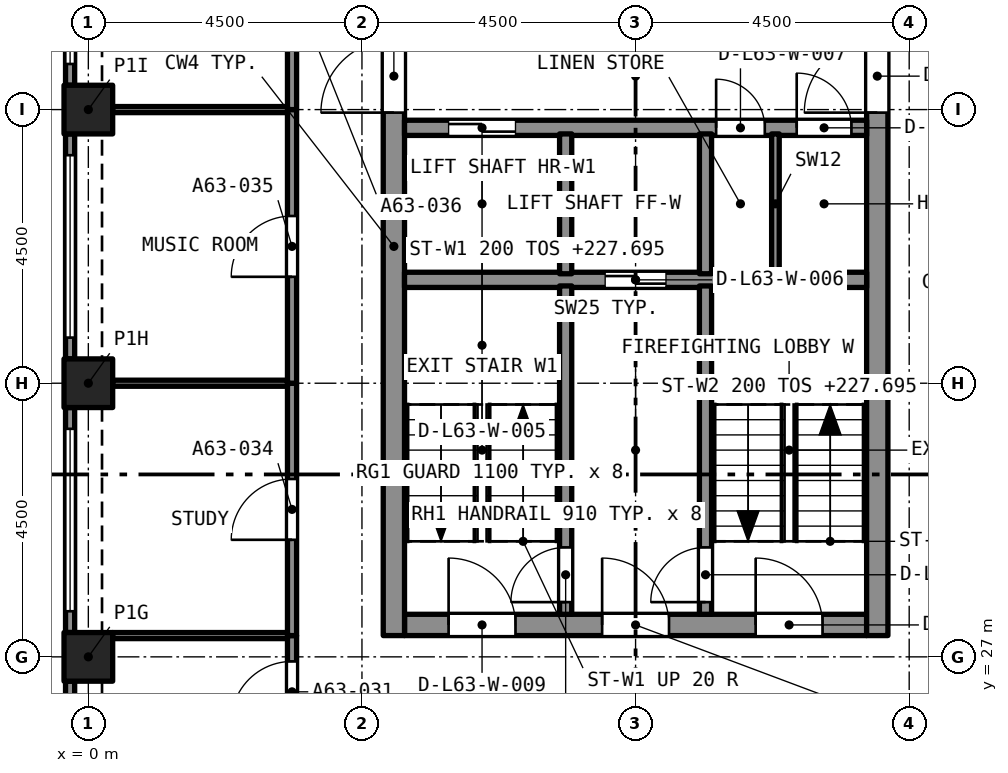
"""IFC4 building model, lengths in metres.
Left out: names, types, materials, properties, quantities, classifications, styles, units other than length and angle.
Written with IfcOpenShell. Run it as: python <this file> out.ifc"""

import sys

from ifc_helpers import new_model, si_unit, direction, frame, frame_2d, origin, origin_2d, place, context, subcontext, project, spatial, rectangle, extrude, element, fill, save


model = new_model("IFC4")
c1 = context("Model", 3, precision=1e-05, world=origin(), true_north=direction((0.0, 1.0)))
c2 = subcontext(c1, "Body", "Model", "MODEL_VIEW")
j1 = project(units=[si_unit("LENGTHUNIT", "METRE"), si_unit("PLANEANGLEUNIT", "RADIAN")], contexts=[c1])
p1 = place(None, origin())
s1 = spatial("IfcSite", under=j1, at=p1, CompositionType="ELEMENT")
p2 = place(p1, origin())
s2 = spatial("IfcBuilding", under=s1, at=p2, CompositionType="ELEMENT")
p3 = place(p2, frame((0.0, 0.0, 226.095)))
s3 = spatial("IfcBuildingStorey", under=s2, at=p3, CompositionType="ELEMENT", Elevation=226.095)
for number, where, z_axis, x_axis in (
    (1, (0.0, 27.0, 0.0), (0.0, 0.0, 1.0), (1.0, 0.0, 0.0)),
    (2, (0.0, 31.5, 0.0), (0.0, 0.0, 1.0), (1.0, 0.0, 0.0)),
    (3, (0.0, 36.0, 0.0), (0.0, 0.0, 1.0), (1.0, 0.0, 0.0)),
):
    element("IfcColumn", number, at=place(p3, frame(where, z_axis=z_axis, x_axis=x_axis)), inside=s3, PredefinedType="COLUMN", context=c2, shape_type="SweptSolid", body=[
        extrude(rectangle(XDim=0.8, YDim=0.8, at=origin_2d()), origin(), (0.0, 0.0, 1.0), 3.2),
    ])
p4 = place(p3, frame((5.2, 27.525, 0.0), z_axis=(0.0, 0.0, 1.0), x_axis=(1.0, 0.0, 0.0)))
e4 = element("IfcWall", 4, at=p4, inside=s3, PredefinedType="SOLIDWALL", context=c2, shape_type="SweptSolid", body=[
    extrude(rectangle(XDim=7.6, YDim=0.35, at=frame_2d((3.8, 0.0))), origin(), (0.0, 0.0, 1.0), 3.2),
])
p5 = place(p4, frame((0.725, 0.0, 0.0)))
e5 = element("IfcOpeningElement", 5, at=p5, cuts=e4, PredefinedType="OPENING", context=c2, shape_type="SweptSolid", body=[
    extrude(rectangle(XDim=1.1, YDim=2.1, at=frame_2d((0.55, 1.05))), frame((0.0, 0.185, 0.0), z_axis=(0.0, -1.0, 0.0), x_axis=(1.0, 0.0, 0.0)), (0.0, 0.0, 1.0), 0.37),
])
p6 = place(p4, frame((3.25, 0.0, 0.0)))
e6 = element("IfcOpeningElement", 6, at=p6, cuts=e4, PredefinedType="OPENING", context=c2, shape_type="SweptSolid", body=[
    extrude(rectangle(XDim=1.1, YDim=2.1, at=frame_2d((0.55, 1.05))), frame((0.0, 0.185, 0.0), z_axis=(0.0, -1.0, 0.0), x_axis=(1.0, 0.0, 0.0)), (0.0, 0.0, 1.0), 0.37),
])
p7 = place(p4, frame((5.775, 0.0, 0.0)))
e7 = element("IfcOpeningElement", 7, at=p7, cuts=e4, PredefinedType="OPENING", context=c2, shape_type="SweptSolid", body=[
    extrude(rectangle(XDim=1.1, YDim=2.1, at=frame_2d((0.55, 1.05))), frame((0.0, 0.185, 0.0), z_axis=(0.0, -1.0, 0.0), x_axis=(1.0, 0.0, 0.0)), (0.0, 0.0, 1.0), 0.37),
])
p8 = place(p3, frame((5.025, 27.35, 0.0), z_axis=(0.0, 0.0, 1.0), x_axis=(0.0, 1.0, 0.0)))
e8 = element("IfcWall", 8, at=p8, inside=s3, PredefinedType="SOLIDWALL", context=c2, shape_type="SweptSolid", body=[
    extrude(rectangle(XDim=12.8, YDim=0.35, at=frame_2d((6.4, 0.0))), origin(), (0.0, 0.0, 1.0), 3.2),
])
p9 = place(p8, frame((8.6, 0.0, 0.0)))
e9 = element("IfcOpeningElement", 9, at=p9, cuts=e8, PredefinedType="OPENING", context=c2, shape_type="SweptSolid", body=[
    extrude(rectangle(XDim=1.2, YDim=2.1, at=frame_2d((0.6, 1.05))), frame((0.0, 0.185, 0.0), z_axis=(0.0, -1.0, 0.0), x_axis=(1.0, 0.0, 0.0)), (0.0, 0.0, 1.0), 0.37),
])
p10 = place(p3, frame((12.975, 27.35, 0.0), z_axis=(0.0, 0.0, 1.0), x_axis=(0.0, 1.0, 0.0)))
e10 = element("IfcWall", 10, at=p10, inside=s3, PredefinedType="SOLIDWALL", context=c2, shape_type="SweptSolid", body=[
    extrude(rectangle(XDim=12.8, YDim=0.35, at=frame_2d((6.4, 0.0))), origin(), (0.0, 0.0, 1.0), 3.2),
])
p11 = place(p10, frame((10.75, 0.0, 0.0)))
e11 = element("IfcOpeningElement", 11, at=p11, cuts=e10, PredefinedType="OPENING", context=c2, shape_type="SweptSolid", body=[
    extrude(rectangle(XDim=1.1, YDim=2.1, at=frame_2d((0.55, 1.05))), frame((0.0, 0.185, 0.0), z_axis=(0.0, -1.0, 0.0), x_axis=(1.0, 0.0, 0.0)), (0.0, 0.0, 1.0), 0.37),
])
p12 = place(p10, frame((8.6, 0.0, 0.0)))
e12 = element("IfcOpeningElement", 12, at=p12, cuts=e10, PredefinedType="OPENING", context=c2, shape_type="SweptSolid", body=[
    extrude(rectangle(XDim=1.2, YDim=2.1, at=frame_2d((0.6, 1.05))), frame((0.0, 0.185, 0.0), z_axis=(0.0, -1.0, 0.0), x_axis=(1.0, 0.0, 0.0)), (0.0, 0.0, 1.0), 0.37),
])
p13 = place(p3, frame((-0.3, 36.4, 0.0), z_axis=(0.0, 0.0, 1.0), x_axis=(0.0, 1.0, 0.0)))
e13 = element("IfcWall", 13, at=p13, inside=s3, PredefinedType="SOLIDWALL", context=c2, shape_type="SweptSolid", body=[
    extrude(rectangle(XDim=3.7, YDim=0.15, at=frame_2d((1.85, 0.0))), origin(), (0.0, 0.0, 1.0), 3.2),
])
p14 = place(p13, frame((0.35, 0.0, 0.45)))
e14 = element("IfcOpeningElement", 14, at=p14, cuts=e13, PredefinedType="OPENING", context=c2, shape_type="SweptSolid", body=[
    extrude(rectangle(XDim=3.0, YDim=1.95, at=frame_2d((1.5, 0.975))), frame((0.0, 0.085, 0.0), z_axis=(0.0, -1.0, 0.0), x_axis=(1.0, 0.0, 0.0)), (0.0, 0.0, 1.0), 0.17),
])
p15 = place(p3, frame((-0.3, 31.9, 0.0), z_axis=(0.0, 0.0, 1.0), x_axis=(0.0, 1.0, 0.0)))
e15 = element("IfcWall", 15, at=p15, inside=s3, PredefinedType="SOLIDWALL", context=c2, shape_type="SweptSolid", body=[
    extrude(rectangle(XDim=3.7, YDim=0.15, at=frame_2d((1.85, 0.0))), origin(), (0.0, 0.0, 1.0), 3.2),
])
p16 = place(p15, frame((0.35, 0.0, 0.45)))
e16 = element("IfcOpeningElement", 16, at=p16, cuts=e15, PredefinedType="OPENING", context=c2, shape_type="SweptSolid", body=[
    extrude(rectangle(XDim=3.0, YDim=1.95, at=frame_2d((1.5, 0.975))), frame((0.0, 0.085, 0.0), z_axis=(0.0, -1.0, 0.0), x_axis=(1.0, 0.0, 0.0)), (0.0, 0.0, 1.0), 0.17),
])
p17 = place(p3, frame((-0.3, 27.4, 0.0), z_axis=(0.0, 0.0, 1.0), x_axis=(0.0, 1.0, 0.0)))
e17 = element("IfcWall", 17, at=p17, inside=s3, PredefinedType="SOLIDWALL", context=c2, shape_type="SweptSolid", body=[
    extrude(rectangle(XDim=3.7, YDim=0.15, at=frame_2d((1.85, 0.0))), origin(), (0.0, 0.0, 1.0), 3.2),
])
p18 = place(p17, frame((0.35, 0.0, 0.45)))
e18 = element("IfcOpeningElement", 18, at=p18, cuts=e17, PredefinedType="OPENING", context=c2, shape_type="SweptSolid", body=[
    extrude(rectangle(XDim=3.0, YDim=1.95, at=frame_2d((1.5, 0.975))), frame((0.0, 0.085, 0.0), z_axis=(0.0, -1.0, 0.0), x_axis=(1.0, 0.0, 0.0)), (0.0, 0.0, 1.0), 0.17),
])
p19 = place(p3, frame((-0.3, 22.9, 0.0), z_axis=(0.0, 0.0, 1.0), x_axis=(0.0, 1.0, 0.0)))
e19 = element("IfcWall", 19, at=p19, inside=s3, PredefinedType="SOLIDWALL", context=c2, shape_type="SweptSolid", body=[
    extrude(rectangle(XDim=3.7, YDim=0.15, at=frame_2d((1.85, 0.0))), origin(), (0.0, 0.0, 1.0), 3.2),
])
p20 = place(p19, frame((0.35, 0.0, 0.45)))
e20 = element("IfcOpeningElement", 20, at=p20, cuts=e19, PredefinedType="OPENING", context=c2, shape_type="SweptSolid", body=[
    extrude(rectangle(XDim=3.0, YDim=1.95, at=frame_2d((1.5, 0.975))), frame((0.0, 0.085, 0.0), z_axis=(0.0, -1.0, 0.0), x_axis=(1.0, 0.0, 0.0)), (0.0, 0.0, 1.0), 0.17),
])
p21 = place(p3, frame((3.35, 25.425, 0.0), z_axis=(0.0, 0.0, 1.0), x_axis=(0.0, 1.0, 0.0)))
e21 = element("IfcWall", 21, at=p21, inside=s3, PredefinedType="PARTITIONING", context=c2, shape_type="SweptSolid", body=[
    extrude(rectangle(XDim=1.925, YDim=0.15, at=frame_2d((0.962, 0.0))), origin(), (0.0, 0.0, 1.0), 2.9),
])
p22 = place(p21, frame((0.5, 0.0, 0.0)))
e22 = element("IfcOpeningElement", 22, at=p22, cuts=e21, PredefinedType="OPENING", context=c2, shape_type="SweptSolid", body=[
    extrude(rectangle(XDim=1.0, YDim=2.1, at=frame_2d((0.5, 1.05))), frame((0.0, 0.085, 0.0), z_axis=(0.0, -1.0, 0.0), x_axis=(1.0, 0.0, 0.0)), (0.0, 0.0, 1.0), 0.17),
])
p23 = place(p3, frame((3.35, 27.35, 0.0), z_axis=(0.0, 0.0, 1.0), x_axis=(0.0, 1.0, 0.0)))
e23 = element("IfcWall", 23, at=p23, inside=s3, PredefinedType="PARTITIONING", context=c2, shape_type="SweptSolid", body=[
    extrude(rectangle(XDim=4.15, YDim=0.15, at=frame_2d((2.075, 0.0))), origin(), (0.0, 0.0, 1.0), 2.9),
])
p24 = place(p23, frame((1.575, 0.0, 0.0)))
e24 = element("IfcOpeningElement", 24, at=p24, cuts=e23, PredefinedType="OPENING", context=c2, shape_type="SweptSolid", body=[
    extrude(rectangle(XDim=1.0, YDim=2.1, at=frame_2d((0.5, 1.05))), frame((0.0, 0.085, 0.0), z_axis=(0.0, -1.0, 0.0), x_axis=(1.0, 0.0, 0.0)), (0.0, 0.0, 1.0), 0.17),
])
p25 = place(p3, frame((3.35, 31.5, 0.0), z_axis=(0.0, 0.0, 1.0), x_axis=(0.0, 1.0, 0.0)))
e25 = element("IfcWall", 25, at=p25, inside=s3, PredefinedType="PARTITIONING", context=c2, shape_type="SweptSolid", body=[
    extrude(rectangle(XDim=4.5, YDim=0.15, at=frame_2d((2.25, 0.0))), origin(), (0.0, 0.0, 1.0), 2.9),
])
p26 = place(p25, frame((1.75, 0.0, 0.0)))
e26 = element("IfcOpeningElement", 26, at=p26, cuts=e25, PredefinedType="OPENING", context=c2, shape_type="SweptSolid", body=[
    extrude(rectangle(XDim=1.0, YDim=2.1, at=frame_2d((0.5, 1.05))), frame((0.0, 0.085, 0.0), z_axis=(0.0, -1.0, 0.0), x_axis=(1.0, 0.0, 0.0)), (0.0, 0.0, 1.0), 0.17),
])
p27 = place(p3, frame((3.35, 36.0, 0.0), z_axis=(0.0, 0.0, 1.0), x_axis=(0.0, 1.0, 0.0)))
e27 = element("IfcWall", 27, at=p27, inside=s3, PredefinedType="PARTITIONING", context=c2, shape_type="SweptSolid", body=[
    extrude(rectangle(XDim=4.025, YDim=0.15, at=frame_2d((2.012, 0.0))), origin(), (0.0, 0.0, 1.0), 2.9),
])
p28 = place(p27, frame((1.575, 0.0, 0.0)))
e28 = element("IfcOpeningElement", 28, at=p28, cuts=e27, PredefinedType="OPENING", context=c2, shape_type="SweptSolid", body=[
    extrude(rectangle(XDim=1.0, YDim=2.1, at=frame_2d((0.5, 1.05))), frame((0.0, 0.085, 0.0), z_axis=(0.0, -1.0, 0.0), x_axis=(1.0, 0.0, 0.0)), (0.0, 0.0, 1.0), 0.17),
])
for number, where, z_axis, x_axis in (
    (29, (0.4, 27.35, 0.0), (0.0, 0.0, 1.0), (1.0, 0.0, 0.0)),
    (30, (0.4, 31.5, 0.0), (0.0, 0.0, 1.0), (1.0, 0.0, 0.0)),
    (31, (0.4, 36.0, 0.0), (0.0, 0.0, 1.0), (1.0, 0.0, 0.0)),
):
    element("IfcWall", number, at=place(p3, frame(where, z_axis=z_axis, x_axis=x_axis)), inside=s3, PredefinedType="PARTITIONING", context=c2, shape_type="SweptSolid", body=[
        extrude(rectangle(XDim=2.875, YDim=0.1, at=frame_2d((1.438, 0.0))), origin(), (0.0, 0.0, 1.0), 2.9),
    ])
p29 = place(p3, frame((5.2, 33.2, 0.0), z_axis=(0.0, 0.0, 1.0), x_axis=(1.0, 0.0, 0.0)))
e32 = element("IfcWall", 32, at=p29, inside=s3, PredefinedType="SOLIDWALL", context=c2, shape_type="SweptSolid", body=[
    extrude(rectangle(XDim=7.6, YDim=0.25, at=frame_2d((3.8, 0.0))), origin(), (0.0, 0.0, 1.0), 2.9),
])
p30 = place(p29, frame((3.3, 0.0, 0.0)))
e33 = element("IfcOpeningElement", 33, at=p30, cuts=e32, PredefinedType="OPENING", context=c2, shape_type="SweptSolid", body=[
    extrude(rectangle(XDim=1.0, YDim=2.1, at=frame_2d((0.5, 1.05))), frame((0.0, 0.135, 0.0), z_axis=(0.0, -1.0, 0.0), x_axis=(1.0, 0.0, 0.0)), (0.0, 0.0, 1.0), 0.27),
])
p31 = place(p3, frame((5.2, 35.7, 0.0), z_axis=(0.0, 0.0, 1.0), x_axis=(1.0, 0.0, 0.0)))
e34 = element("IfcWall", 34, at=p31, inside=s3, PredefinedType="SOLIDWALL", context=c2, shape_type="SweptSolid", body=[
    extrude(rectangle(XDim=7.6, YDim=0.25, at=frame_2d((3.8, 0.0))), origin(), (0.0, 0.0, 1.0), 2.9),
])
p32 = place(p31, frame((0.725, 0.0, 0.0)))
e35 = element("IfcOpeningElement", 35, at=p32, cuts=e34, PredefinedType="OPENING", context=c2, shape_type="SweptSolid", body=[
    extrude(rectangle(XDim=1.1, YDim=2.4, at=frame_2d((0.55, 1.2))), frame((0.0, 0.135, 0.0), z_axis=(0.0, -1.0, 0.0), x_axis=(1.0, 0.0, 0.0)), (0.0, 0.0, 1.0), 0.27),
])
p33 = place(p31, frame((5.125, 0.0, 0.0)))
e36 = element("IfcOpeningElement", 36, at=p33, cuts=e34, PredefinedType="OPENING", context=c2, shape_type="SweptSolid", body=[
    extrude(rectangle(XDim=0.8, YDim=2.1, at=frame_2d((0.4, 1.05))), frame((0.0, 0.135, 0.0), z_axis=(0.0, -1.0, 0.0), x_axis=(1.0, 0.0, 0.0)), (0.0, 0.0, 1.0), 0.27),
])
p34 = place(p31, frame((6.45, 0.0, 0.0)))
e37 = element("IfcOpeningElement", 37, at=p34, cuts=e34, PredefinedType="OPENING", context=c2, shape_type="SweptSolid", body=[
    extrude(rectangle(XDim=0.9, YDim=2.1, at=frame_2d((0.45, 1.05))), frame((0.0, 0.135, 0.0), z_axis=(0.0, -1.0, 0.0), x_axis=(1.0, 0.0, 0.0)), (0.0, 0.0, 1.0), 0.27),
])
p35 = place(p3, frame((7.85, 27.7, 0.0), z_axis=(0.0, 0.0, 1.0), x_axis=(0.0, 1.0, 0.0)))
e38 = element("IfcWall", 38, at=p35, inside=s3, PredefinedType="SOLIDWALL", context=c2, shape_type="SweptSolid", body=[
    extrude(rectangle(XDim=5.4, YDim=0.2, at=frame_2d((2.7, 0.0))), origin(), (0.0, 0.0, 1.0), 2.9),
])
p36 = place(p35, frame((0.2, 0.0, 0.0)))
e39 = element("IfcOpeningElement", 39, at=p36, cuts=e38, PredefinedType="OPENING", context=c2, shape_type="SweptSolid", body=[
    extrude(rectangle(XDim=0.9, YDim=2.1, at=frame_2d((0.45, 1.05))), frame((0.0, 0.11, 0.0), z_axis=(0.0, -1.0, 0.0), x_axis=(1.0, 0.0, 0.0)), (0.0, 0.0, 1.0), 0.22),
])
p37 = place(p3, frame((10.15, 27.7, 0.0), z_axis=(0.0, 0.0, 1.0), x_axis=(0.0, 1.0, 0.0)))
e40 = element("IfcWall", 40, at=p37, inside=s3, PredefinedType="SOLIDWALL", context=c2, shape_type="SweptSolid", body=[
    extrude(rectangle(XDim=5.4, YDim=0.2, at=frame_2d((2.7, 0.0))), origin(), (0.0, 0.0, 1.0), 2.9),
])
p38 = place(p37, frame((0.2, 0.0, 0.0)))
e41 = element("IfcOpeningElement", 41, at=p38, cuts=e40, PredefinedType="OPENING", context=c2, shape_type="SweptSolid", body=[
    extrude(rectangle(XDim=0.9, YDim=2.1, at=frame_2d((0.45, 1.05))), frame((0.0, 0.11, 0.0), z_axis=(0.0, -1.0, 0.0), x_axis=(1.0, 0.0, 0.0)), (0.0, 0.0, 1.0), 0.22),
])
for number, where, z_axis, x_axis in (
    (42, (7.85, 33.3, 0.0), (0.0, 0.0, 1.0), (0.0, 1.0, 0.0)),
    (43, (10.15, 33.3, 0.0), (0.0, 0.0, 1.0), (0.0, 1.0, 0.0)),
):
    element("IfcWall", number, at=place(p3, frame(where, z_axis=z_axis, x_axis=x_axis)), inside=s3, PredefinedType="SOLIDWALL", context=c2, shape_type="SweptSolid", body=[
        extrude(rectangle(XDim=2.3, YDim=0.2, at=frame_2d((1.15, 0.0))), origin(), (0.0, 0.0, 1.0), 2.9),
    ])
p39 = place(p3, frame((11.3, 33.3, 0.0), z_axis=(0.0, 0.0, 1.0), x_axis=(0.0, 1.0, 0.0)))
e44 = element("IfcWall", 44, at=p39, inside=s3, PredefinedType="PARTITIONING", context=c2, shape_type="SweptSolid", body=[
    extrude(rectangle(XDim=2.3, YDim=0.125, at=frame_2d((1.15, 0.0))), origin(), (0.0, 0.0, 1.0), 2.9),
])
p40 = place(p14, origin())
e45 = element("IfcWindow", 45, at=p40, inside=s3, PartitioningType="SINGLE_PANEL", PredefinedType="WINDOW", context=c2, shape_type="SweptSolid", body=[
    extrude(rectangle(XDim=3.0, YDim=1.95, at=frame_2d((1.5, 0.975))), frame((0.0, 0.03, 0.0), z_axis=(0.0, -1.0, 0.0), x_axis=(1.0, 0.0, 0.0)), (0.0, 0.0, 1.0), 0.06),
])
fill(e14, e45)
p41 = place(p16, origin())
e46 = element("IfcWindow", 46, at=p41, inside=s3, PartitioningType="SINGLE_PANEL", PredefinedType="WINDOW", context=c2, shape_type="SweptSolid", body=[
    extrude(rectangle(XDim=3.0, YDim=1.95, at=frame_2d((1.5, 0.975))), frame((0.0, 0.03, 0.0), z_axis=(0.0, -1.0, 0.0), x_axis=(1.0, 0.0, 0.0)), (0.0, 0.0, 1.0), 0.06),
])
fill(e16, e46)
p42 = place(p18, origin())
e47 = element("IfcWindow", 47, at=p42, inside=s3, PartitioningType="SINGLE_PANEL", PredefinedType="WINDOW", context=c2, shape_type="SweptSolid", body=[
    extrude(rectangle(XDim=3.0, YDim=1.95, at=frame_2d((1.5, 0.975))), frame((0.0, 0.03, 0.0), z_axis=(0.0, -1.0, 0.0), x_axis=(1.0, 0.0, 0.0)), (0.0, 0.0, 1.0), 0.06),
])
fill(e18, e47)
p43 = place(p22, origin())
e48 = element("IfcDoor", 48, at=p43, inside=s3, OperationType="SINGLE_SWING_RIGHT", PredefinedType="DOOR", context=c2, shape_type="SweptSolid", body=[
    extrude(rectangle(XDim=1.0, YDim=2.1, at=frame_2d((0.5, 1.05))), frame((0.0, 0.025, 0.0), z_axis=(0.0, -1.0, 0.0), x_axis=(1.0, 0.0, 0.0)), (0.0, 0.0, 1.0), 0.05),
])
fill(e22, e48)
p44 = place(p24, origin())
e49 = element("IfcDoor", 49, at=p44, inside=s3, OperationType="SINGLE_SWING_RIGHT", PredefinedType="DOOR", context=c2, shape_type="SweptSolid", body=[
    extrude(rectangle(XDim=1.0, YDim=2.1, at=frame_2d((0.5, 1.05))), frame((0.0, 0.025, 0.0), z_axis=(0.0, -1.0, 0.0), x_axis=(1.0, 0.0, 0.0)), (0.0, 0.0, 1.0), 0.05),
])
fill(e24, e49)
p45 = place(p26, origin())
e50 = element("IfcDoor", 50, at=p45, inside=s3, OperationType="SINGLE_SWING_RIGHT", PredefinedType="DOOR", context=c2, shape_type="SweptSolid", body=[
    extrude(rectangle(XDim=1.0, YDim=2.1, at=frame_2d((0.5, 1.05))), frame((0.0, 0.025, 0.0), z_axis=(0.0, -1.0, 0.0), x_axis=(1.0, 0.0, 0.0)), (0.0, 0.0, 1.0), 0.05),
])
fill(e26, e50)
p46 = place(p36, origin())
e51 = element("IfcDoor", 51, at=p46, inside=s3, OperationType="SINGLE_SWING_LEFT", PredefinedType="DOOR", context=c2, shape_type="SweptSolid", body=[
    extrude(rectangle(XDim=0.9, YDim=2.1, at=frame_2d((0.45, 1.05))), frame((0.0, 0.025, 0.0), z_axis=(0.0, -1.0, 0.0), x_axis=(1.0, 0.0, 0.0)), (0.0, 0.0, 1.0), 0.05),
])
fill(e39, e51)
p47 = place(p38, origin())
e52 = element("IfcDoor", 52, at=p47, inside=s3, OperationType="SINGLE_SWING_LEFT", PredefinedType="DOOR", context=c2, shape_type="SweptSolid", body=[
    extrude(rectangle(XDim=0.9, YDim=2.1, at=frame_2d((0.45, 1.05))), frame((0.0, 0.025, 0.0), z_axis=(0.0, -1.0, 0.0), x_axis=(1.0, 0.0, 0.0)), (0.0, 0.0, 1.0), 0.05),
])
fill(e41, e52)
p48 = place(p32, origin())
e53 = element("IfcDoor", 53, at=p48, inside=s3, OperationType="SLIDING_TO_LEFT", PredefinedType="DOOR", context=c2, shape_type="SweptSolid", body=[
    extrude(rectangle(XDim=1.1, YDim=2.4, at=frame_2d((0.55, 1.2))), frame((0.0, 0.025, 0.0), z_axis=(0.0, -1.0, 0.0), x_axis=(1.0, 0.0, 0.0)), (0.0, 0.0, 1.0), 0.05),
])
fill(e35, e53)
p49 = place(p30, origin())
e54 = element("IfcDoor", 54, at=p49, inside=s3, OperationType="SLIDING_TO_LEFT", PredefinedType="DOOR", context=c2, shape_type="SweptSolid", body=[
    extrude(rectangle(XDim=1.0, YDim=2.1, at=frame_2d((0.5, 1.05))), frame((0.0, 0.025, 0.0), z_axis=(0.0, -1.0, 0.0), x_axis=(1.0, 0.0, 0.0)), (0.0, 0.0, 1.0), 0.05),
])
fill(e33, e54)
p50 = place(p33, origin())
e55 = element("IfcDoor", 55, at=p50, inside=s3, OperationType="SINGLE_SWING_LEFT", PredefinedType="DOOR", context=c2, shape_type="SweptSolid", body=[
    extrude(rectangle(XDim=0.8, YDim=2.1, at=frame_2d((0.4, 1.05))), frame((0.0, 0.025, 0.0), z_axis=(0.0, -1.0, 0.0), x_axis=(1.0, 0.0, 0.0)), (0.0, 0.0, 1.0), 0.05),
])
fill(e36, e55)
p51 = place(p34, origin())
e56 = element("IfcDoor", 56, at=p51, inside=s3, OperationType="SINGLE_SWING_LEFT", PredefinedType="DOOR", context=c2, shape_type="SweptSolid", body=[
    extrude(rectangle(XDim=0.9, YDim=2.1, at=frame_2d((0.45, 1.05))), frame((0.0, 0.025, 0.0), z_axis=(0.0, -1.0, 0.0), x_axis=(1.0, 0.0, 0.0)), (0.0, 0.0, 1.0), 0.05),
])
fill(e37, e56)
p52 = place(p5, origin())
e57 = element("IfcDoor", 57, at=p52, inside=s3, OperationType="SINGLE_SWING_LEFT", PredefinedType="DOOR", context=c2, shape_type="SweptSolid", body=[
    extrude(rectangle(XDim=1.1, YDim=2.1, at=frame_2d((0.55, 1.05))), frame((0.0, 0.025, 0.0), z_axis=(0.0, -1.0, 0.0), x_axis=(1.0, 0.0, 0.0)), (0.0, 0.0, 1.0), 0.05),
])
fill(e5, e57)
p53 = place(p6, origin())
e58 = element("IfcDoor", 58, at=p53, inside=s3, OperationType="SINGLE_SWING_LEFT", PredefinedType="DOOR", context=c2, shape_type="SweptSolid", body=[
    extrude(rectangle(XDim=1.1, YDim=2.1, at=frame_2d((0.55, 1.05))), frame((0.0, 0.025, 0.0), z_axis=(0.0, -1.0, 0.0), x_axis=(1.0, 0.0, 0.0)), (0.0, 0.0, 1.0), 0.05),
])
fill(e6, e58)
p54 = place(p7, origin())
e59 = element("IfcDoor", 59, at=p54, inside=s3, OperationType="SINGLE_SWING_LEFT", PredefinedType="DOOR", context=c2, shape_type="SweptSolid", body=[
    extrude(rectangle(XDim=1.1, YDim=2.1, at=frame_2d((0.55, 1.05))), frame((0.0, 0.025, 0.0), z_axis=(0.0, -1.0, 0.0), x_axis=(1.0, 0.0, 0.0)), (0.0, 0.0, 1.0), 0.05),
])
fill(e7, e59)
p55 = place(p9, origin())
e60 = element("IfcDoor", 60, at=p55, inside=s3, OperationType="SINGLE_SWING_LEFT", PredefinedType="DOOR", context=c2, shape_type="SweptSolid", body=[
    extrude(rectangle(XDim=1.2, YDim=2.1, at=frame_2d((0.6, 1.05))), frame((0.0, 0.025, 0.0), z_axis=(0.0, -1.0, 0.0), x_axis=(1.0, 0.0, 0.0)), (0.0, 0.0, 1.0), 0.05),
])
fill(e9, e60)
p56 = place(p12, origin())
e61 = element("IfcDoor", 61, at=p56, inside=s3, OperationType="SINGLE_SWING_LEFT", PredefinedType="DOOR", context=c2, shape_type="SweptSolid", body=[
    extrude(rectangle(XDim=1.2, YDim=2.1, at=frame_2d((0.6, 1.05))), frame((0.0, 0.025, 0.0), z_axis=(0.0, -1.0, 0.0), x_axis=(1.0, 0.0, 0.0)), (0.0, 0.0, 1.0), 0.05),
])
fill(e12, e61)
save(model, sys.argv[1])
